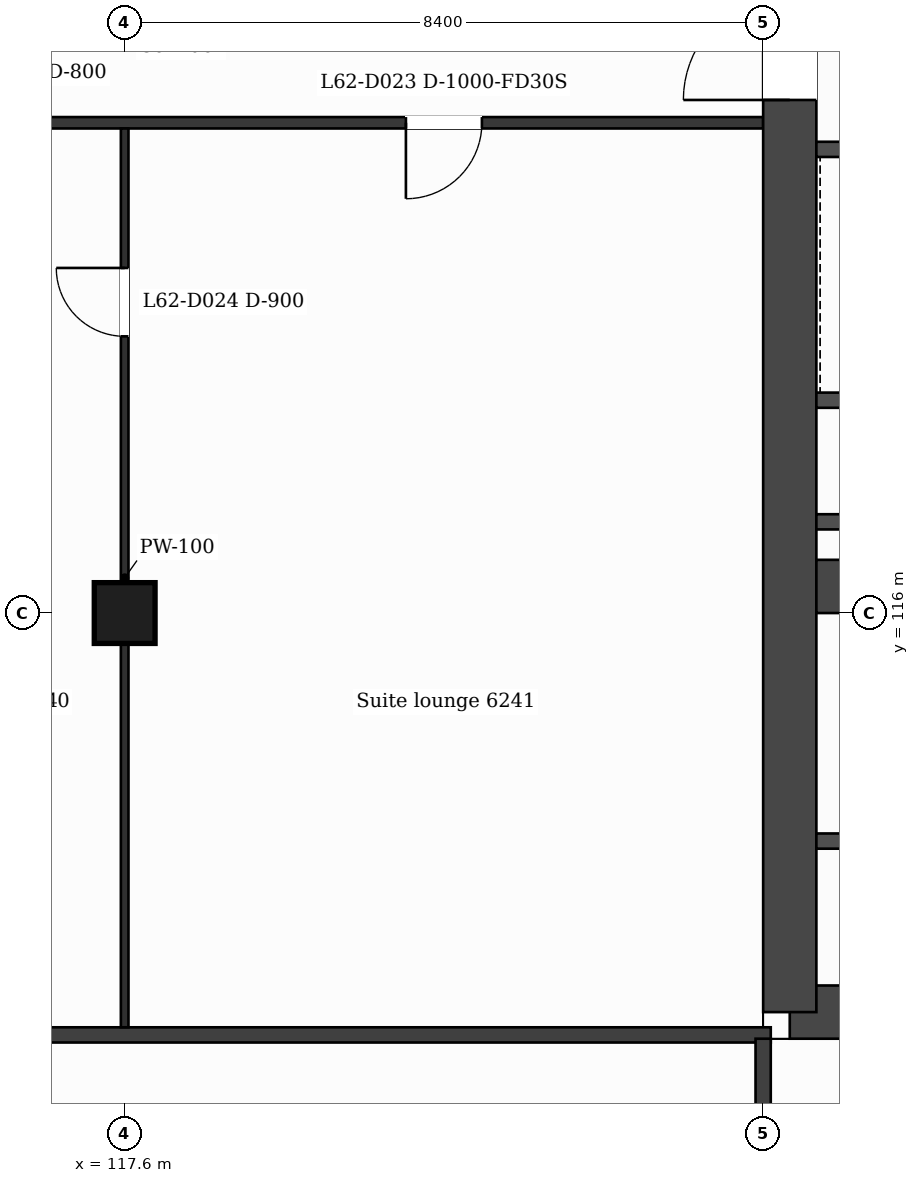
"""IFC4 building model, lengths in metres.
Left out: names, types, materials, properties, quantities, classifications, styles, units other than length and angle.
Written with IfcOpenShell. Run it as: python <this file> out.ifc"""

import sys

from ifc_helpers import new_model, si_unit, direction, frame, frame_2d, origin, origin_2d, place, context, subcontext, project, spatial, rectangle, extrude, element, fill, save


model = new_model("IFC4")
c1 = context("Model", 3, precision=1e-05, world=origin(), true_north=direction((0.0, 1.0)))
c2 = subcontext(c1, "Body", "Model", "MODEL_VIEW")
j1 = project(units=[si_unit("LENGTHUNIT", "METRE"), si_unit("PLANEANGLEUNIT", "RADIAN")], contexts=[c1])
p1 = place(None, origin())
s1 = spatial("IfcSite", under=j1, at=p1, CompositionType="ELEMENT")
p2 = place(p1, origin())
s2 = spatial("IfcBuilding", under=s1, at=p2, CompositionType="ELEMENT")
p3 = place(p2, frame((0.0, 0.0, 259.0)))
s3 = spatial("IfcBuildingStorey", under=s2, at=p3, CompositionType="ELEMENT", Elevation=259.0)
p4 = place(p3, frame((140.73, 110.75, 0.0), z_axis=(0.0, 0.0, 1.0), x_axis=(-1.0, 0.0, 0.0)))
e1 = element("IfcWall", 1, at=p4, inside=s3, PredefinedType="SHEAR", context=c2, shape_type="SweptSolid", body=[
    extrude(rectangle(XDim=14.38, YDim=0.7, at=frame_2d((7.19, 0.0))), origin(), (0.0, 0.0, 1.0), 3.7),
])
p5 = place(p4, frame((7.12, 0.0, 0.0)))
e2 = element("IfcOpeningElement", 2, at=p5, cuts=e1, PredefinedType="OPENING", context=c2, shape_type="SweptSolid", body=[
    extrude(rectangle(XDim=1.2, YDim=2.1, at=frame_2d((0.6, 1.05))), frame((0.0, 0.36, 0.0), z_axis=(0.0, -1.0, 0.0), x_axis=(1.0, 0.0, 0.0)), (0.0, 0.0, 1.0), 0.72),
])
p6 = place(p3, frame((126.35, 110.75, 0.0), z_axis=(0.0, 0.0, 1.0), x_axis=(0.0, 1.0, 0.0)))
e3 = element("IfcWall", 3, at=p6, inside=s3, PredefinedType="SHEAR", context=c2, shape_type="SweptSolid", body=[
    extrude(rectangle(XDim=21.3, YDim=0.7, at=frame_2d((10.65, 0.0))), origin(), (0.0, 0.0, 1.0), 3.7),
])
p7 = place(p6, frame((12.0, 0.0, 0.0)))
e4 = element("IfcOpeningElement", 4, at=p7, cuts=e3, PredefinedType="OPENING", context=c2, shape_type="SweptSolid", body=[
    extrude(rectangle(XDim=1.4, YDim=2.1, at=frame_2d((0.7, 1.05))), frame((0.0, 0.36, 0.0), z_axis=(0.0, -1.0, 0.0), x_axis=(1.0, 0.0, 0.0)), (0.0, 0.0, 1.0), 0.72),
])
p8 = place(p3, frame((126.7, 116.35, 0.0), z_axis=(0.0, 0.0, 1.0), x_axis=(1.0, 0.0, 0.0)))
e5 = element("IfcWall", 5, at=p8, inside=s3, PredefinedType="SHEAR", context=c2, shape_type="SweptSolid", body=[
    extrude(rectangle(XDim=5.5, YDim=0.7, at=frame_2d((2.75, 0.0))), origin(), (0.0, 0.0, 1.0), 3.7),
])
p9 = place(p3, frame((117.6, 116.0, 0.0), z_axis=(0.0, 0.0, 1.0), x_axis=(1.0, 0.0, 0.0)))
e6 = element("IfcColumn", 6, at=p9, inside=s3, PredefinedType="COLUMN", context=c2, shape_type="SweptSolid", body=[
    extrude(rectangle(XDim=0.8, YDim=0.8, at=origin_2d()), origin(), (0.0, 0.0, 1.0), 3.7),
])
p10 = place(p3, frame((100.7, 110.45, 0.0), z_axis=(0.0, 0.0, 1.0), x_axis=(1.0, 0.0, 0.0)))
e7 = element("IfcWall", 7, at=p10, inside=s3, PredefinedType="PARTITIONING", context=c2, shape_type="SweptSolid", body=[
    extrude(rectangle(XDim=25.4, YDim=0.2, at=frame_2d((12.7, 0.0))), origin(), (0.0, 0.0, 1.0), 3.38),
])
p11 = place(p3, frame((126.7, 113.0, 0.0), z_axis=(0.0, 0.0, 1.0), x_axis=(1.0, 0.0, 0.0)))
e8 = element("IfcWall", 8, at=p11, inside=s3, PredefinedType="PARTITIONING", context=c2, shape_type="SweptSolid", body=[
    extrude(rectangle(XDim=4.973, YDim=0.2, at=frame_2d((2.487, 0.0))), origin(), (0.0, 0.0, 1.0), 3.38),
])
p12 = place(p11, frame((0.768, 0.0, 0.0)))
e9 = element("IfcOpeningElement", 9, at=p12, cuts=e8, PredefinedType="OPENING", context=c2, shape_type="SweptSolid", body=[
    extrude(rectangle(XDim=0.9, YDim=2.1, at=frame_2d((0.45, 1.05))), frame((0.0, 0.11, 0.0), z_axis=(0.0, -1.0, 0.0), x_axis=(1.0, 0.0, 0.0)), (0.0, 0.0, 1.0), 0.22),
])
for number, where, z_axis, x_axis in (
    (10, (126.7, 117.2, 0.0), (0.0, 0.0, 1.0), (1.0, 0.0, 0.0)),
    (11, (126.7, 118.8, 0.0), (0.0, 0.0, 1.0), (1.0, 0.0, 0.0)),
):
    element("IfcWall", number, at=place(p3, frame(where, z_axis=z_axis, x_axis=x_axis)), inside=s3, PredefinedType="PARTITIONING", context=c2, shape_type="SweptSolid", body=[
        extrude(rectangle(XDim=4.873, YDim=0.2, at=frame_2d((2.437, 0.0))), origin(), (0.0, 0.0, 1.0), 3.38),
    ])
p13 = place(p3, frame((126.7, 122.1, 0.0), z_axis=(0.0, 0.0, 1.0), x_axis=(1.0, 0.0, 0.0)))
e12 = element("IfcWall", 12, at=p13, inside=s3, PredefinedType="PARTITIONING", context=c2, shape_type="SweptSolid", body=[
    extrude(rectangle(XDim=4.873, YDim=0.2, at=frame_2d((2.437, 0.0))), origin(), (0.0, 0.0, 1.0), 3.38),
])
p14 = place(p13, frame((3.041, 0.0, 0.0)))
e13 = element("IfcOpeningElement", 13, at=p14, cuts=e12, PredefinedType="OPENING", context=c2, shape_type="SweptSolid", body=[
    extrude(rectangle(XDim=1.1, YDim=2.1, at=frame_2d((0.55, 1.05))), frame((0.0, 0.11, 0.0), z_axis=(0.0, -1.0, 0.0), x_axis=(1.0, 0.0, 0.0)), (0.0, 0.0, 1.0), 0.22),
])
p15 = place(p13, frame((0.732, 0.0, 0.0)))
e14 = element("IfcOpeningElement", 14, at=p15, cuts=e12, PredefinedType="OPENING", context=c2, shape_type="SweptSolid", body=[
    extrude(rectangle(XDim=1.1, YDim=2.1, at=frame_2d((0.55, 1.05))), frame((0.0, 0.11, 0.0), z_axis=(0.0, -1.0, 0.0), x_axis=(1.0, 0.0, 0.0)), (0.0, 0.0, 1.0), 0.22),
])
p16 = place(p3, frame((100.8, 122.45, 0.0), z_axis=(0.0, 0.0, 1.0), x_axis=(1.0, 0.0, 0.0)))
e15 = element("IfcWall", 15, at=p16, inside=s3, PredefinedType="PARTITIONING", context=c2, shape_type="SweptSolid", body=[
    extrude(rectangle(XDim=25.2, YDim=0.15, at=frame_2d((12.6, 0.0))), origin(), (0.0, 0.0, 1.0), 3.38),
])
p17 = place(p16, frame((0.63, 0.0, 0.0)))
e16 = element("IfcOpeningElement", 16, at=p17, cuts=e15, PredefinedType="OPENING", context=c2, shape_type="SweptSolid", body=[
    extrude(rectangle(XDim=1.0, YDim=2.1, at=frame_2d((0.5, 1.05))), frame((0.0, 0.085, 0.0), z_axis=(0.0, -1.0, 0.0), x_axis=(1.0, 0.0, 0.0)), (0.0, 0.0, 1.0), 0.17),
])
p18 = place(p16, frame((6.875, 0.0, 0.0)))
e17 = element("IfcOpeningElement", 17, at=p18, cuts=e15, PredefinedType="OPENING", context=c2, shape_type="SweptSolid", body=[
    extrude(rectangle(XDim=0.95, YDim=2.1, at=frame_2d((0.475, 1.05))), frame((0.0, 0.085, 0.0), z_axis=(0.0, -1.0, 0.0), x_axis=(1.0, 0.0, 0.0)), (0.0, 0.0, 1.0), 0.17),
])
p19 = place(p16, frame((8.925, 0.0, 0.0)))
e18 = element("IfcOpeningElement", 18, at=p19, cuts=e15, PredefinedType="OPENING", context=c2, shape_type="SweptSolid", body=[
    extrude(rectangle(XDim=1.0, YDim=2.1, at=frame_2d((0.5, 1.05))), frame((0.0, 0.085, 0.0), z_axis=(0.0, -1.0, 0.0), x_axis=(1.0, 0.0, 0.0)), (0.0, 0.0, 1.0), 0.17),
])
p20 = place(p16, frame((20.5, 0.0, 0.0)))
e19 = element("IfcOpeningElement", 19, at=p20, cuts=e15, PredefinedType="OPENING", context=c2, shape_type="SweptSolid", body=[
    extrude(rectangle(XDim=1.0, YDim=2.1, at=frame_2d((0.5, 1.05))), frame((0.0, 0.085, 0.0), z_axis=(0.0, -1.0, 0.0), x_axis=(1.0, 0.0, 0.0)), (0.0, 0.0, 1.0), 0.17),
])
p21 = place(p3, frame((117.6, 110.55, 0.0), z_axis=(0.0, 0.0, 1.0), x_axis=(0.0, 1.0, 0.0)))
e20 = element("IfcWall", 20, at=p21, inside=s3, PredefinedType="PARTITIONING", context=c2, shape_type="SweptSolid", body=[
    extrude(rectangle(XDim=11.825, YDim=0.1, at=frame_2d((5.913, 0.0))), origin(), (0.0, 0.0, 1.0), 3.38),
])
p22 = place(p21, frame((9.09, 0.0, 0.0)))
e21 = element("IfcOpeningElement", 21, at=p22, cuts=e20, PredefinedType="OPENING", context=c2, shape_type="SweptSolid", body=[
    extrude(rectangle(XDim=0.9, YDim=2.1, at=frame_2d((0.45, 1.05))), frame((0.0, 0.06, 0.0), z_axis=(0.0, -1.0, 0.0), x_axis=(1.0, 0.0, 0.0)), (0.0, 0.0, 1.0), 0.12),
])
p23 = place(p3, frame((126.0, 108.79, 0.0), z_axis=(0.0, 0.0, 1.0), x_axis=(0.0, 1.0, 0.0)))
e22 = element("IfcWall", 22, at=p23, inside=s3, PredefinedType="PARTITIONING", context=c2, shape_type="SweptSolid", body=[
    extrude(rectangle(XDim=1.61, YDim=0.2, at=frame_2d((0.805, 0.0))), origin(), (0.0, 0.0, 1.0), 3.38),
])
p24 = place(p20, origin())
e23 = element("IfcDoor", 23, at=p24, inside=s3, OperationType="SINGLE_SWING_LEFT", PredefinedType="DOOR", context=c2, shape_type="SweptSolid", body=[
    extrude(rectangle(XDim=1.0, YDim=2.1, at=frame_2d((0.5, 1.05))), frame((0.0, 0.025, 0.0), z_axis=(0.0, -1.0, 0.0), x_axis=(1.0, 0.0, 0.0)), (0.0, 0.0, 1.0), 0.05),
])
fill(e19, e23)
p25 = place(p22, origin())
e24 = element("IfcDoor", 24, at=p25, inside=s3, OperationType="SINGLE_SWING_RIGHT", PredefinedType="DOOR", context=c2, shape_type="SweptSolid", body=[
    extrude(rectangle(XDim=0.9, YDim=2.1, at=frame_2d((0.45, 1.05))), frame((0.0, 0.025, 0.0), z_axis=(0.0, -1.0, 0.0), x_axis=(1.0, 0.0, 0.0)), (0.0, 0.0, 1.0), 0.05),
])
fill(e21, e24)
p26 = place(p7, origin())
e25 = element("IfcDoor", 25, at=p26, inside=s3, OperationType="SINGLE_SWING_LEFT", PredefinedType="DOOR", context=c2, shape_type="SweptSolid", body=[
    extrude(rectangle(XDim=1.4, YDim=2.1, at=frame_2d((0.7, 1.05))), frame((0.0, 0.025, 0.0), z_axis=(0.0, -1.0, 0.0), x_axis=(1.0, 0.0, 0.0)), (0.0, 0.0, 1.0), 0.05),
])
fill(e4, e25)
save(model, sys.argv[1])
